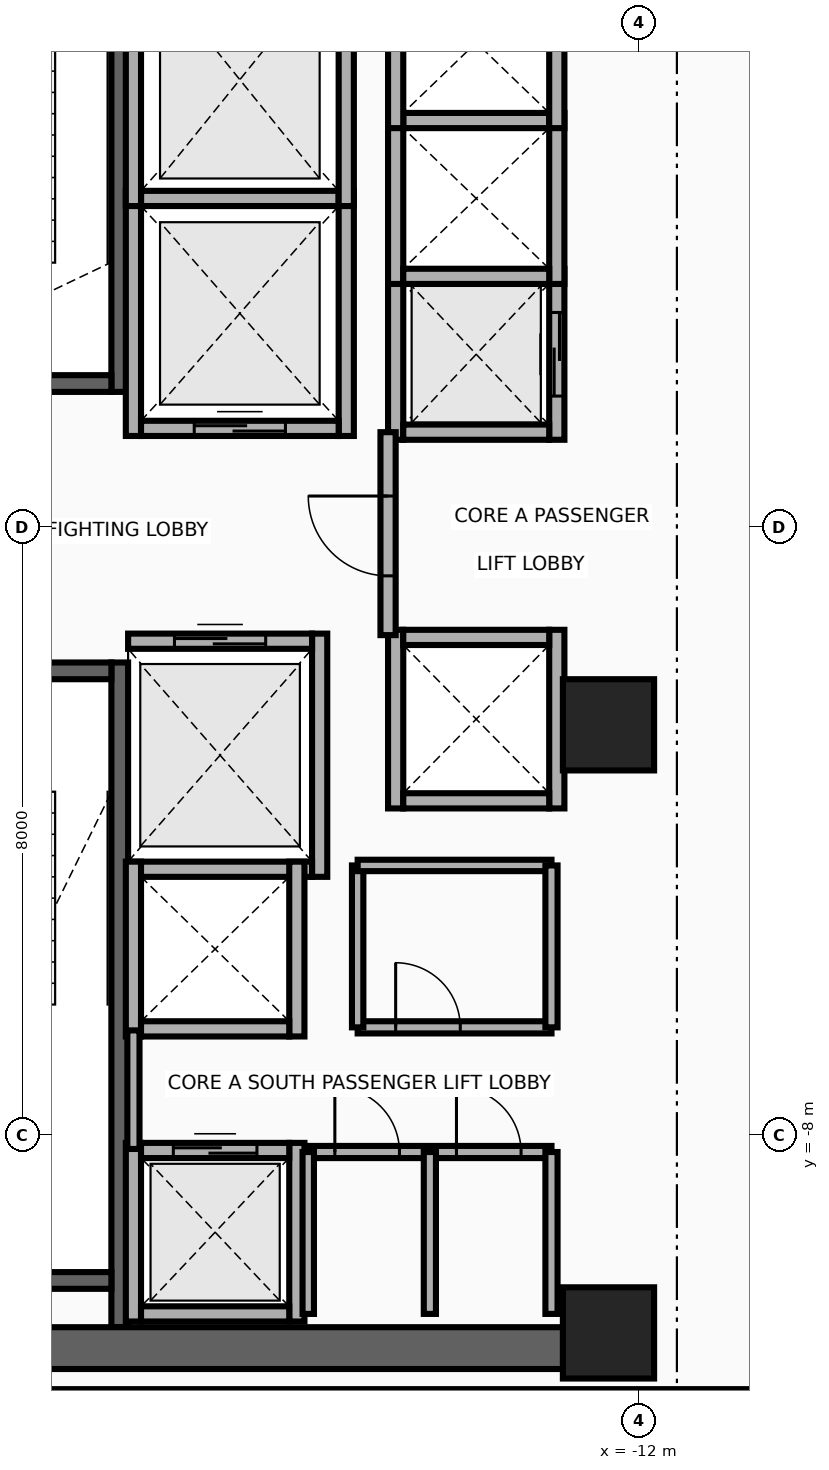
"""IFC4 building model, lengths in metres.
Left out: names, types, materials, properties, quantities, classifications, styles, units other than length and angle.
Written with IfcOpenShell. Run it as: python <this file> out.ifc"""

import sys

from ifc_helpers import new_model, si_unit, direction, frame, frame_2d, origin, origin_2d, place, context, subcontext, project, spatial, rectangle, extrude, source, transform, mapped, element, fill, save


model = new_model("IFC4")
c1 = context("Model", 3, precision=1e-05, world=origin(), true_north=direction((0.0, 1.0)))
c2 = subcontext(c1, "Body", "Model", "MODEL_VIEW")
j1 = project(units=[si_unit("LENGTHUNIT", "METRE"), si_unit("PLANEANGLEUNIT", "RADIAN")], contexts=[c1])
p1 = place(None, origin())
s1 = spatial("IfcSite", under=j1, at=p1, CompositionType="ELEMENT")
p2 = place(p1, origin())
s2 = spatial("IfcBuilding", under=s1, at=p2, CompositionType="ELEMENT")
p3 = place(p2, frame((0.0, 0.0, 161.2)))
s3 = spatial("IfcBuildingStorey", under=s2, at=p3, CompositionType="ELEMENT", Elevation=161.2)
p4 = place(p3, frame((-18.83, 1.78, 0.0), z_axis=(0.0, 0.0, 1.0), x_axis=(0.0, 1.0, 0.0)))
e1 = element("IfcWall", 1, at=p4, inside=s3, PredefinedType="SHEAR", context=c2, shape_type="SweptSolid", body=[
    extrude(rectangle(XDim=8.745, YDim=0.22, at=frame_2d((4.373, 0.0))), origin(), (0.0, 0.0, 1.0), 3.46),
])
p5 = place(p3, frame((-22.05, 1.89, 0.0), z_axis=(0.0, 0.0, 1.0), x_axis=(1.0, 0.0, 0.0)))
e2 = element("IfcWall", 2, at=p5, inside=s3, PredefinedType="SHEAR", context=c2, shape_type="SweptSolid", body=[
    extrude(rectangle(XDim=3.11, YDim=0.22, at=frame_2d((1.555, 0.0))), origin(), (0.0, 0.0, 1.0), 3.46),
])
p6 = place(p5, frame((1.0, 0.0, 0.0)))
e3 = element("IfcOpeningElement", 3, at=p6, cuts=e2, PredefinedType="OPENING", context=c2, shape_type="SweptSolid", body=[
    extrude(rectangle(XDim=1.1, YDim=2.15, at=frame_2d((0.55, 1.075))), frame((0.0, 0.125, 0.0), z_axis=(0.0, -1.0, 0.0), x_axis=(1.0, 0.0, 0.0)), (0.0, 0.0, 1.0), 0.25),
])
p7 = place(p3, frame((-18.83, -10.525, 0.0), z_axis=(0.0, 0.0, 1.0), x_axis=(0.0, 1.0, 0.0)))
e4 = element("IfcWall", 4, at=p7, inside=s3, PredefinedType="SHEAR", context=c2, shape_type="SweptSolid", body=[
    extrude(rectangle(XDim=8.745, YDim=0.22, at=frame_2d((4.373, 0.0))), origin(), (0.0, 0.0, 1.0), 3.46),
])
p8 = place(p3, frame((-22.05, -9.91, 0.0), z_axis=(0.0, 0.0, 1.0), x_axis=(1.0, 0.0, 0.0)))
e5 = element("IfcWall", 5, at=p8, inside=s3, PredefinedType="SHEAR", context=c2, shape_type="SweptSolid", body=[
    extrude(rectangle(XDim=3.11, YDim=0.22, at=frame_2d((1.555, 0.0))), origin(), (0.0, 0.0, 1.0), 3.46),
])
p9 = place(p3, frame((-22.05, -1.89, 0.0), z_axis=(0.0, 0.0, 1.0), x_axis=(1.0, 0.0, 0.0)))
e6 = element("IfcWall", 6, at=p9, inside=s3, PredefinedType="SHEAR", context=c2, shape_type="SweptSolid", body=[
    extrude(rectangle(XDim=3.11, YDim=0.22, at=frame_2d((1.555, 0.0))), origin(), (0.0, 0.0, 1.0), 3.46),
])
p10 = place(p9, frame((1.0, 0.0, 0.0)))
e7 = element("IfcOpeningElement", 7, at=p10, cuts=e6, PredefinedType="OPENING", context=c2, shape_type="SweptSolid", body=[
    extrude(rectangle(XDim=1.1, YDim=2.15, at=frame_2d((0.55, 1.075))), frame((0.0, 0.125, 0.0), z_axis=(0.0, -1.0, 0.0), x_axis=(1.0, 0.0, 0.0)), (0.0, 0.0, 1.0), 0.25),
])
p11 = place(p3, frame((-22.65, -10.8, 0.0), z_axis=(0.0, 0.0, 1.0), x_axis=(1.0, 0.0, 0.0)))
e8 = element("IfcWall", 8, at=p11, inside=s3, PredefinedType="SHEAR", context=c2, shape_type="SweptSolid", body=[
    extrude(rectangle(XDim=10.25, YDim=0.55, at=frame_2d((5.125, 0.0))), origin(), (0.0, 0.0, 1.0), 3.46),
])
m1 = source(origin(), c2, "Body", "SweptSolid", [
    extrude(rectangle(XDim=1.2, YDim=1.2, at=origin_2d()), origin(), (0.0, 0.0, 1.0), 3.7),
])
for number, where, z_axis, x_axis in (
    (9, (-12.4, -10.6, 0.0), (0.0, 0.0, 1.0), (1.0, 0.0, 0.0)),
    (10, (-12.4, -2.6, 0.0), (0.0, 0.0, 1.0), (1.0, 0.0, 0.0)),
):
    element("IfcColumn", number, at=place(p3, frame(where, z_axis=z_axis, x_axis=x_axis)), inside=s3, PredefinedType="COLUMN", context=c2, shape_type="MappedRepresentation", body=[
        mapped(m1, transform((0.0, 0.0, 0.0), x_axis=(1.0, 0.0, 0.0), y_axis=(0.0, 1.0, 0.0), z_axis=(0.0, 0.0, 1.0), scale=1.0)),
    ])
for number, where, z_axis, x_axis in (
    (11, (-18.65, 1.2, 0.0), (0.0, 0.0, 1.0), (0.0, 1.0, 0.0)),
    (12, (-15.85, 1.2, 0.0), (0.0, 0.0, 1.0), (0.0, 1.0, 0.0)),
):
    element("IfcWall", number, at=place(p3, frame(where, z_axis=z_axis, x_axis=x_axis)), inside=s3, PredefinedType="MOVABLE", context=c2, shape_type="SweptSolid", body=[
        extrude(rectangle(XDim=3.225, YDim=0.2, at=frame_2d((1.613, 0.0))), origin(), (0.0, 0.0, 1.0), 3.46),
    ])
p12 = place(p3, frame((-18.55, 1.3, 0.0), z_axis=(0.0, 0.0, 1.0), x_axis=(1.0, 0.0, 0.0)))
e13 = element("IfcWall", 13, at=p12, inside=s3, PredefinedType="MOVABLE", context=c2, shape_type="SweptSolid", body=[
    extrude(rectangle(XDim=2.6, YDim=0.2, at=frame_2d((1.3, 0.0))), origin(), (0.0, 0.0, 1.0), 3.46),
])
p13 = place(p12, frame((0.7, 0.0, 0.0)))
e14 = element("IfcOpeningElement", 14, at=p13, cuts=e13, PredefinedType="OPENING", context=c2, shape_type="SweptSolid", body=[
    extrude(rectangle(XDim=1.2, YDim=2.1, at=frame_2d((0.6, 1.05))), frame((0.0, 0.115, 0.0), z_axis=(0.0, -1.0, 0.0), x_axis=(1.0, 0.0, 0.0)), (0.0, 0.0, 1.0), 0.23),
])
p14 = place(p3, frame((-18.55, 4.325, 0.0), z_axis=(0.0, 0.0, 1.0), x_axis=(1.0, 0.0, 0.0)))
e15 = element("IfcWall", 15, at=p14, inside=s3, PredefinedType="MOVABLE", context=c2, shape_type="SweptSolid", body=[
    extrude(rectangle(XDim=2.6, YDim=0.2, at=frame_2d((1.3, 0.0))), origin(), (0.0, 0.0, 1.0), 3.46),
])
p15 = place(p3, frame((-16.2, -4.6, 0.0), z_axis=(0.0, 0.0, 1.0), x_axis=(0.0, 1.0, 0.0)))
e16 = element("IfcWall", 16, at=p15, inside=s3, PredefinedType="MOVABLE", context=c2, shape_type="SweptSolid", body=[
    extrude(rectangle(XDim=3.2, YDim=0.2, at=frame_2d((1.6, 0.0))), origin(), (0.0, 0.0, 1.0), 3.46),
])
p16 = place(p3, frame((-18.72, -4.5, 0.0), z_axis=(0.0, 0.0, 1.0), x_axis=(1.0, 0.0, 0.0)))
e17 = element("IfcWall", 17, at=p16, inside=s3, PredefinedType="MOVABLE", context=c2, shape_type="SweptSolid", body=[
    extrude(rectangle(XDim=2.42, YDim=0.2, at=frame_2d((1.21, 0.0))), origin(), (0.0, 0.0, 1.0), 3.46),
])
p17 = place(p3, frame((-18.72, -1.5, 0.0), z_axis=(0.0, 0.0, 1.0), x_axis=(1.0, 0.0, 0.0)))
e18 = element("IfcWall", 18, at=p17, inside=s3, PredefinedType="MOVABLE", context=c2, shape_type="SweptSolid", body=[
    extrude(rectangle(XDim=2.42, YDim=0.2, at=frame_2d((1.21, 0.0))), origin(), (0.0, 0.0, 1.0), 3.46),
])
p18 = place(p17, frame((0.61, 0.0, 0.0)))
e19 = element("IfcOpeningElement", 19, at=p18, cuts=e18, PredefinedType="OPENING", context=c2, shape_type="SweptSolid", body=[
    extrude(rectangle(XDim=1.2, YDim=2.1, at=frame_2d((0.6, 1.05))), frame((0.0, 0.115, 0.0), z_axis=(0.0, -1.0, 0.0), x_axis=(1.0, 0.0, 0.0)), (0.0, 0.0, 1.0), 0.23),
])
for number, where, z_axis, x_axis in (
    (20, (-18.65, 4.225, 0.0), (0.0, 0.0, 1.0), (0.0, 1.0, 0.0)),
    (21, (-15.85, 4.225, 0.0), (0.0, 0.0, 1.0), (0.0, 1.0, 0.0)),
):
    element("IfcWall", number, at=place(p3, frame(where, z_axis=z_axis, x_axis=x_axis)), inside=s3, PredefinedType="MOVABLE", context=c2, shape_type="SweptSolid", body=[
        extrude(rectangle(XDim=3.325, YDim=0.2, at=frame_2d((1.663, 0.0))), origin(), (0.0, 0.0, 1.0), 3.46),
    ])
for number, where, z_axis, x_axis in (
    (22, (-18.65, -10.45, 0.0), (0.0, 0.0, 1.0), (0.0, 1.0, 0.0)),
    (23, (-16.5, -10.45, 0.0), (0.0, 0.0, 1.0), (0.0, 1.0, 0.0)),
):
    element("IfcWall", number, at=place(p3, frame(where, z_axis=z_axis, x_axis=x_axis)), inside=s3, PredefinedType="MOVABLE", context=c2, shape_type="SweptSolid", body=[
        extrude(rectangle(XDim=2.35, YDim=0.2, at=frame_2d((1.175, 0.0))), origin(), (0.0, 0.0, 1.0), 2.666),
    ])
p19 = place(p3, frame((-18.55, -10.35, 0.0), z_axis=(0.0, 0.0, 1.0), x_axis=(1.0, 0.0, 0.0)))
e24 = element("IfcWall", 24, at=p19, inside=s3, PredefinedType="MOVABLE", context=c2, shape_type="SweptSolid", body=[
    extrude(rectangle(XDim=1.95, YDim=0.2, at=frame_2d((0.975, 0.0))), origin(), (0.0, 0.0, 1.0), 2.666),
])
p20 = place(p3, frame((-18.55, -8.2, 0.0), z_axis=(0.0, 0.0, 1.0), x_axis=(1.0, 0.0, 0.0)))
e25 = element("IfcWall", 25, at=p20, inside=s3, PredefinedType="MOVABLE", context=c2, shape_type="SweptSolid", body=[
    extrude(rectangle(XDim=1.95, YDim=0.2, at=frame_2d((0.975, 0.0))), origin(), (0.0, 0.0, 1.0), 3.46),
])
p21 = place(p20, frame((0.425, 0.0, 0.0)))
e26 = element("IfcOpeningElement", 26, at=p21, cuts=e25, PredefinedType="OPENING", context=c2, shape_type="SweptSolid", body=[
    extrude(rectangle(XDim=1.1, YDim=2.1, at=frame_2d((0.55, 1.05))), frame((0.0, 0.115, 0.0), z_axis=(0.0, -1.0, 0.0), x_axis=(1.0, 0.0, 0.0)), (0.0, 0.0, 1.0), 0.23),
])
p22 = place(p3, frame((-15.2, 1.15, 0.0), z_axis=(0.0, 0.0, 1.0), x_axis=(0.0, 1.0, 0.0)))
e27 = element("IfcWall", 27, at=p22, inside=s3, PredefinedType="MOVABLE", context=c2, shape_type="SweptSolid", body=[
    extrude(rectangle(XDim=2.25, YDim=0.2, at=frame_2d((1.125, 0.0))), origin(), (0.0, 0.0, 1.0), 3.46),
])
p23 = place(p3, frame((-13.08, 1.15, 0.0), z_axis=(0.0, 0.0, 1.0), x_axis=(0.0, 1.0, 0.0)))
e28 = element("IfcWall", 28, at=p23, inside=s3, PredefinedType="MOVABLE", context=c2, shape_type="SweptSolid", body=[
    extrude(rectangle(XDim=2.25, YDim=0.2, at=frame_2d((1.125, 0.0))), origin(), (0.0, 0.0, 1.0), 3.46),
])
p24 = place(p23, frame((0.575, 0.0, 0.0)))
e29 = element("IfcOpeningElement", 29, at=p24, cuts=e28, PredefinedType="OPENING", context=c2, shape_type="SweptSolid", body=[
    extrude(rectangle(XDim=1.1, YDim=2.1, at=frame_2d((0.55, 1.05))), frame((0.0, 0.115, 0.0), z_axis=(0.0, -1.0, 0.0), x_axis=(1.0, 0.0, 0.0)), (0.0, 0.0, 1.0), 0.23),
])
p25 = place(p3, frame((-15.1, 1.25, 0.0), z_axis=(0.0, 0.0, 1.0), x_axis=(1.0, 0.0, 0.0)))
e30 = element("IfcWall", 30, at=p25, inside=s3, PredefinedType="MOVABLE", context=c2, shape_type="SweptSolid", body=[
    extrude(rectangle(XDim=1.92, YDim=0.2, at=frame_2d((0.96, 0.0))), origin(), (0.0, 0.0, 1.0), 3.46),
])
for number, where, z_axis, x_axis in (
    (31, (-15.2, 3.2, 0.0), (0.0, 0.0, 1.0), (0.0, 1.0, 0.0)),
    (32, (-13.08, 3.2, 0.0), (0.0, 0.0, 1.0), (0.0, 1.0, 0.0)),
):
    element("IfcWall", number, at=place(p3, frame(where, z_axis=z_axis, x_axis=x_axis)), inside=s3, PredefinedType="MOVABLE", context=c2, shape_type="SweptSolid", body=[
        extrude(rectangle(XDim=2.25, YDim=0.2, at=frame_2d((1.125, 0.0))), origin(), (0.0, 0.0, 1.0), 3.46),
    ])
for number, where, z_axis, x_axis in (
    (33, (-15.1, 3.3, 0.0), (0.0, 0.0, 1.0), (1.0, 0.0, 0.0)),
    (34, (-15.1, 5.35, 0.0), (0.0, 0.0, 1.0), (1.0, 0.0, 0.0)),
):
    element("IfcWall", number, at=place(p3, frame(where, z_axis=z_axis, x_axis=x_axis)), inside=s3, PredefinedType="MOVABLE", context=c2, shape_type="SweptSolid", body=[
        extrude(rectangle(XDim=1.92, YDim=0.2, at=frame_2d((0.96, 0.0))), origin(), (0.0, 0.0, 1.0), 3.46),
    ])
for number, where, z_axis, x_axis in (
    (35, (-15.2, 5.25, 0.0), (0.0, 0.0, 1.0), (0.0, 1.0, 0.0)),
    (36, (-13.08, 5.25, 0.0), (0.0, 0.0, 1.0), (0.0, 1.0, 0.0)),
):
    element("IfcWall", number, at=place(p3, frame(where, z_axis=z_axis, x_axis=x_axis)), inside=s3, PredefinedType="MOVABLE", context=c2, shape_type="SweptSolid", body=[
        extrude(rectangle(XDim=2.25, YDim=0.2, at=frame_2d((1.125, 0.0))), origin(), (0.0, 0.0, 1.0), 3.46),
    ])
for number, where, z_axis, x_axis in (
    (37, (-18.65, -6.7, 0.0), (0.0, 0.0, 1.0), (0.0, 1.0, 0.0)),
    (38, (-16.5, -6.7, 0.0), (0.0, 0.0, 1.0), (0.0, 1.0, 0.0)),
):
    element("IfcWall", number, at=place(p3, frame(where, z_axis=z_axis, x_axis=x_axis)), inside=s3, PredefinedType="MOVABLE", context=c2, shape_type="SweptSolid", body=[
        extrude(rectangle(XDim=2.3, YDim=0.2, at=frame_2d((1.15, 0.0))), origin(), (0.0, 0.0, 1.0), 3.46),
    ])
p26 = place(p3, frame((-18.55, -6.6, 0.0), z_axis=(0.0, 0.0, 1.0), x_axis=(1.0, 0.0, 0.0)))
e39 = element("IfcWall", 39, at=p26, inside=s3, PredefinedType="MOVABLE", context=c2, shape_type="SweptSolid", body=[
    extrude(rectangle(XDim=1.95, YDim=0.2, at=frame_2d((0.975, 0.0))), origin(), (0.0, 0.0, 1.0), 3.46),
])
for number, where, z_axis, x_axis in (
    (40, (-15.2, -3.7, 0.0), (0.0, 0.0, 1.0), (0.0, 1.0, 0.0)),
    (41, (-13.08, -3.7, 0.0), (0.0, 0.0, 1.0), (0.0, 1.0, 0.0)),
):
    element("IfcWall", number, at=place(p3, frame(where, z_axis=z_axis, x_axis=x_axis)), inside=s3, PredefinedType="MOVABLE", context=c2, shape_type="SweptSolid", body=[
        extrude(rectangle(XDim=2.35, YDim=0.2, at=frame_2d((1.175, 0.0))), origin(), (0.0, 0.0, 1.0), 3.46),
    ])
for number, where, z_axis, x_axis in (
    (42, (-15.1, -3.6, 0.0), (0.0, 0.0, 1.0), (1.0, 0.0, 0.0)),
    (43, (-15.1, -1.45, 0.0), (0.0, 0.0, 1.0), (1.0, 0.0, 0.0)),
):
    element("IfcWall", number, at=place(p3, frame(where, z_axis=z_axis, x_axis=x_axis)), inside=s3, PredefinedType="MOVABLE", context=c2, shape_type="SweptSolid", body=[
        extrude(rectangle(XDim=1.92, YDim=0.2, at=frame_2d((0.96, 0.0))), origin(), (0.0, 0.0, 1.0), 3.46),
    ])
p27 = place(p3, frame((-15.3, -1.42, 0.0), z_axis=(0.0, 0.0, 1.0), x_axis=(0.0, 1.0, 0.0)))
e44 = element("IfcWall", 44, at=p27, inside=s3, PredefinedType="PARTITIONING", context=c2, shape_type="SweptSolid", body=[
    extrude(rectangle(XDim=2.67, YDim=0.2, at=frame_2d((1.335, 0.0))), origin(), (0.0, 0.0, 1.0), 3.46),
])
p28 = place(p27, frame((0.78, 0.0, 0.0)))
e45 = element("IfcOpeningElement", 45, at=p28, cuts=e44, PredefinedType="OPENING", context=c2, shape_type="SweptSolid", body=[
    extrude(rectangle(XDim=1.05, YDim=2.15, at=frame_2d((0.525, 1.075))), frame((0.0, 0.115, 0.0), z_axis=(0.0, -1.0, 0.0), x_axis=(1.0, 0.0, 0.0)), (0.0, 0.0, 1.0), 0.23),
])
p29 = place(p3, frame((-18.65, -8.18, 0.0), z_axis=(0.0, 0.0, 1.0), x_axis=(0.0, 1.0, 0.0)))
e46 = element("IfcWall", 46, at=p29, inside=s3, PredefinedType="PARTITIONING", context=c2, shape_type="SweptSolid", body=[
    extrude(rectangle(XDim=1.56, YDim=0.16, at=frame_2d((0.78, 0.0))), origin(), (0.0, 0.0, 1.0), 3.46),
])
p30 = place(p3, frame((-16.35, -8.22, 0.0), z_axis=(0.0, 0.0, 1.0), x_axis=(1.0, 0.0, 0.0)))
e47 = element("IfcWall", 47, at=p30, inside=s3, PredefinedType="PARTITIONING", context=c2, shape_type="SweptSolid", body=[
    extrude(rectangle(XDim=3.2, YDim=0.16, at=frame_2d((1.6, 0.0))), origin(), (0.0, 0.0, 1.0), 3.46),
])
p31 = place(p30, frame((0.35, 0.0, 0.0)))
e48 = element("IfcOpeningElement", 48, at=p31, cuts=e47, PredefinedType="OPENING", context=c2, shape_type="SweptSolid", body=[
    extrude(rectangle(XDim=0.85, YDim=2.05, at=frame_2d((0.425, 1.025))), frame((0.0, 0.095, 0.0), z_axis=(0.0, -1.0, 0.0), x_axis=(1.0, 0.0, 0.0)), (0.0, 0.0, 1.0), 0.19),
])
p32 = place(p30, frame((1.95, 0.0, 0.0)))
e49 = element("IfcOpeningElement", 49, at=p32, cuts=e47, PredefinedType="OPENING", context=c2, shape_type="SweptSolid", body=[
    extrude(rectangle(XDim=0.85, YDim=2.05, at=frame_2d((0.425, 1.025))), frame((0.0, 0.095, 0.0), z_axis=(0.0, -1.0, 0.0), x_axis=(1.0, 0.0, 0.0)), (0.0, 0.0, 1.0), 0.19),
])
p33 = place(p3, frame((-16.35, -10.35, 0.0), z_axis=(0.0, 0.0, 1.0), x_axis=(0.0, 1.0, 0.0)))
e50 = element("IfcWall", 50, at=p33, inside=s3, PredefinedType="PARTITIONING", context=c2, shape_type="SweptSolid", body=[
    extrude(rectangle(XDim=2.13, YDim=0.15, at=frame_2d((1.065, 0.0))), origin(), (0.0, 0.0, 1.0), 3.46),
])
for number, where, z_axis, x_axis in (
    (51, (-13.15, -10.35, 0.0), (0.0, 0.0, 1.0), (0.0, 1.0, 0.0)),
    (52, (-14.75, -10.35, 0.0), (0.0, 0.0, 1.0), (0.0, 1.0, 0.0)),
):
    element("IfcWall", number, at=place(p3, frame(where, z_axis=z_axis, x_axis=x_axis)), inside=s3, PredefinedType="PARTITIONING", context=c2, shape_type="SweptSolid", body=[
        extrude(rectangle(XDim=2.13, YDim=0.16, at=frame_2d((1.065, 0.0))), origin(), (0.0, 0.0, 1.0), 3.46),
    ])
p34 = place(p3, frame((-15.7, -6.58, 0.0), z_axis=(0.0, 0.0, 1.0), x_axis=(1.0, 0.0, 0.0)))
e53 = element("IfcWall", 53, at=p34, inside=s3, PredefinedType="PARTITIONING", context=c2, shape_type="SweptSolid", body=[
    extrude(rectangle(XDim=2.55, YDim=0.16, at=frame_2d((1.275, 0.0))), origin(), (0.0, 0.0, 1.0), 3.46),
])
p35 = place(p34, frame((0.5, 0.0, 0.0)))
e54 = element("IfcOpeningElement", 54, at=p35, cuts=e53, PredefinedType="OPENING", context=c2, shape_type="SweptSolid", body=[
    extrude(rectangle(XDim=0.85, YDim=2.05, at=frame_2d((0.425, 1.025))), frame((0.0, 0.095, 0.0), z_axis=(0.0, -1.0, 0.0), x_axis=(1.0, 0.0, 0.0)), (0.0, 0.0, 1.0), 0.19),
])
p36 = place(p3, frame((-15.7, -6.58, 0.0), z_axis=(0.0, 0.0, 1.0), x_axis=(0.0, 1.0, 0.0)))
e55 = element("IfcWall", 55, at=p36, inside=s3, PredefinedType="PARTITIONING", context=c2, shape_type="SweptSolid", body=[
    extrude(rectangle(XDim=2.13, YDim=0.15, at=frame_2d((1.065, 0.0))), origin(), (0.0, 0.0, 1.0), 3.46),
])
p37 = place(p3, frame((-15.7, -4.45, 0.0), z_axis=(0.0, 0.0, 1.0), x_axis=(1.0, 0.0, 0.0)))
e56 = element("IfcWall", 56, at=p37, inside=s3, PredefinedType="PARTITIONING", context=c2, shape_type="SweptSolid", body=[
    extrude(rectangle(XDim=2.55, YDim=0.15, at=frame_2d((1.275, 0.0))), origin(), (0.0, 0.0, 1.0), 3.46),
])
p38 = place(p3, frame((-13.15, -6.58, 0.0), z_axis=(0.0, 0.0, 1.0), x_axis=(0.0, 1.0, 0.0)))
e57 = element("IfcWall", 57, at=p38, inside=s3, PredefinedType="PARTITIONING", context=c2, shape_type="SweptSolid", body=[
    extrude(rectangle(XDim=2.13, YDim=0.16, at=frame_2d((1.065, 0.0))), origin(), (0.0, 0.0, 1.0), 3.46),
])
p39 = place(p3, frame((-23.45, -11.42, 0.0), z_axis=(0.0, 0.0, 1.0), x_axis=(1.0, 0.0, 0.0)))
e58 = element("IfcWall", 58, at=p39, inside=s3, PredefinedType="PARTITIONING", context=c2, shape_type="SweptSolid", body=[
    extrude(rectangle(XDim=13.84, YDim=0.16, at=frame_2d((6.92, 0.0))), origin(), (0.0, 0.0, 1.0), 2.834),
])
p40 = place(p13, origin())
e59 = element("IfcDoor", 59, at=p40, inside=s3, OperationType="DOUBLE_DOOR_SLIDING", PredefinedType="DOOR", context=c2, shape_type="SweptSolid", body=[
    extrude(rectangle(XDim=1.2, YDim=2.1, at=frame_2d((0.6, 1.05))), frame((0.0, 0.025, 0.0), z_axis=(0.0, -1.0, 0.0), x_axis=(1.0, 0.0, 0.0)), (0.0, 0.0, 1.0), 0.05),
])
fill(e14, e59)
p41 = place(p18, origin())
e60 = element("IfcDoor", 60, at=p41, inside=s3, OperationType="DOUBLE_DOOR_SLIDING", PredefinedType="DOOR", context=c2, shape_type="SweptSolid", body=[
    extrude(rectangle(XDim=1.2, YDim=2.1, at=frame_2d((0.6, 1.05))), frame((0.0, 0.025, 0.0), z_axis=(0.0, -1.0, 0.0), x_axis=(1.0, 0.0, 0.0)), (0.0, 0.0, 1.0), 0.05),
])
fill(e19, e60)
p42 = place(p21, origin())
e61 = element("IfcDoor", 61, at=p42, inside=s3, OperationType="DOUBLE_DOOR_SLIDING", PredefinedType="DOOR", context=c2, shape_type="SweptSolid", body=[
    extrude(rectangle(XDim=1.1, YDim=2.1, at=frame_2d((0.55, 1.05))), frame((0.0, 0.025, 0.0), z_axis=(0.0, -1.0, 0.0), x_axis=(1.0, 0.0, 0.0)), (0.0, 0.0, 1.0), 0.05),
])
fill(e26, e61)
p43 = place(p24, origin())
e62 = element("IfcDoor", 62, at=p43, inside=s3, OperationType="DOUBLE_DOOR_SLIDING", PredefinedType="DOOR", context=c2, shape_type="SweptSolid", body=[
    extrude(rectangle(XDim=1.1, YDim=2.1, at=frame_2d((0.55, 1.05))), frame((0.0, 0.025, 0.0), z_axis=(0.0, -1.0, 0.0), x_axis=(1.0, 0.0, 0.0)), (0.0, 0.0, 1.0), 0.05),
])
fill(e29, e62)
p44 = place(p28, origin())
e63 = element("IfcDoor", 63, at=p44, inside=s3, OperationType="SINGLE_SWING_RIGHT", PredefinedType="DOOR", context=c2, shape_type="SweptSolid", body=[
    extrude(rectangle(XDim=1.05, YDim=2.15, at=frame_2d((0.525, 1.075))), frame((0.0, 0.025, 0.0), z_axis=(0.0, -1.0, 0.0), x_axis=(1.0, 0.0, 0.0)), (0.0, 0.0, 1.0), 0.05),
])
fill(e45, e63)
p45 = place(p31, origin())
e64 = element("IfcDoor", 64, at=p45, inside=s3, OperationType="SINGLE_SWING_RIGHT", PredefinedType="DOOR", context=c2, shape_type="SweptSolid", body=[
    extrude(rectangle(XDim=0.85, YDim=2.05, at=frame_2d((0.425, 1.025))), frame((0.0, 0.025, 0.0), z_axis=(0.0, -1.0, 0.0), x_axis=(1.0, 0.0, 0.0)), (0.0, 0.0, 1.0), 0.05),
])
fill(e48, e64)
p46 = place(p32, origin())
e65 = element("IfcDoor", 65, at=p46, inside=s3, OperationType="SINGLE_SWING_LEFT", PredefinedType="DOOR", context=c2, shape_type="SweptSolid", body=[
    extrude(rectangle(XDim=0.85, YDim=2.05, at=frame_2d((0.425, 1.025))), frame((0.0, 0.025, 0.0), z_axis=(0.0, -1.0, 0.0), x_axis=(1.0, 0.0, 0.0)), (0.0, 0.0, 1.0), 0.05),
])
fill(e49, e65)
p47 = place(p35, origin())
e66 = element("IfcDoor", 66, at=p47, inside=s3, OperationType="SINGLE_SWING_RIGHT", PredefinedType="DOOR", context=c2, shape_type="SweptSolid", body=[
    extrude(rectangle(XDim=0.85, YDim=2.05, at=frame_2d((0.425, 1.025))), frame((0.0, 0.025, 0.0), z_axis=(0.0, -1.0, 0.0), x_axis=(1.0, 0.0, 0.0)), (0.0, 0.0, 1.0), 0.05),
])
fill(e54, e66)
save(model, sys.argv[1])
